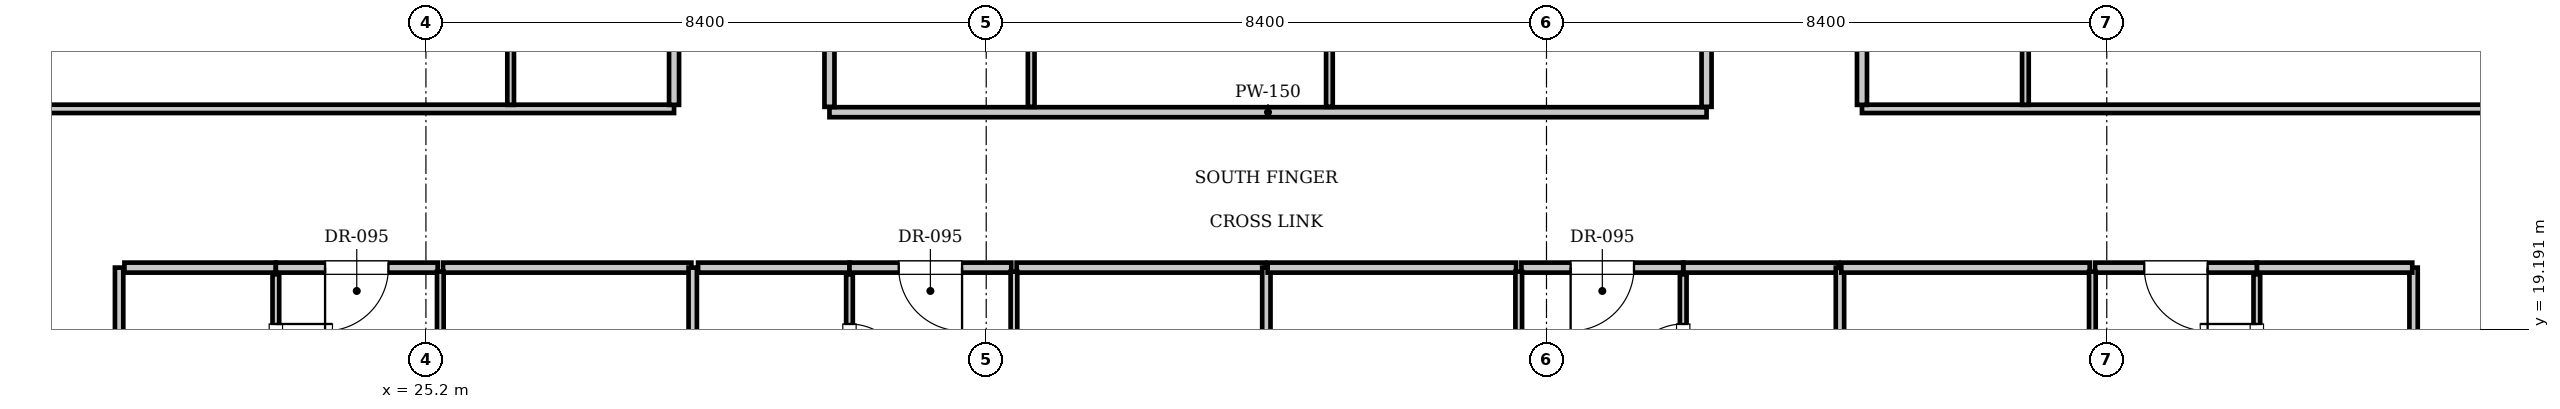
"""IFC4 building model, lengths in metres.
Left out: names, types, materials, properties, quantities, classifications, styles, units other than length and angle.
Written with IfcOpenShell. Run it as: python <this file> out.ifc"""

import sys

from ifc_helpers import new_model, si_unit, direction, frame, frame_2d, origin, place, context, subcontext, project, spatial, rectangle, extrude, element, fill, save


model = new_model("IFC4")
c1 = context("Model", 3, precision=1e-05, world=origin(), true_north=direction((0.0, 1.0)))
c2 = subcontext(c1, "Body", "Model", "MODEL_VIEW")
j1 = project(units=[si_unit("LENGTHUNIT", "METRE"), si_unit("PLANEANGLEUNIT", "RADIAN")], contexts=[c1])
p1 = place(None, origin())
s1 = spatial("IfcSite", under=j1, at=p1, CompositionType="ELEMENT")
p2 = place(p1, origin())
s2 = spatial("IfcBuilding", under=s1, at=p2, CompositionType="ELEMENT")
p3 = place(p2, frame((0.0, 0.0, 254.8)))
s3 = spatial("IfcBuildingStorey", under=s2, at=p3, CompositionType="ELEMENT", Elevation=254.8)
p4 = place(p3, frame((31.25, 22.45, 0.0), z_axis=(0.0, 0.0, 1.0), x_axis=(1.0, 0.0, 0.0)))
e1 = element("IfcWall", 1, at=p4, inside=s3, PredefinedType="PARTITIONING", context=c2, shape_type="SweptSolid", body=[
    extrude(rectangle(XDim=13.15, YDim=0.15, at=frame_2d((6.575, 0.0))), origin(), (0.0, 0.0, 1.0), 3.61),
])
for number, where, z_axis, x_axis in (
    (2, (31.25, 22.53, 0.0), (0.0, 0.0, 1.0), (0.0, 1.0, 0.0)),
    (3, (44.4, 22.53, 0.0), (0.0, 0.0, 1.0), (0.0, 1.0, 0.0)),
):
    element("IfcWall", number, at=place(p3, frame(where, z_axis=z_axis, x_axis=x_axis)), inside=s3, PredefinedType="PARTITIONING", context=c2, shape_type="SweptSolid", body=[
        extrude(rectangle(XDim=8.89, YDim=0.15, at=frame_2d((4.445, 0.0))), origin(), (0.0, 0.0, 1.0), 3.61),
    ])
for number, where, z_axis, x_axis in (
    (4, (34.274, 22.53, 0.0), (0.0, 0.0, 1.0), (0.0, 1.0, 0.0)),
    (5, (38.746, 22.53, 0.0), (0.0, 0.0, 1.0), (0.0, 1.0, 0.0)),
):
    element("IfcWall", number, at=place(p3, frame(where, z_axis=z_axis, x_axis=x_axis)), inside=s3, PredefinedType="PARTITIONING", context=c2, shape_type="SweptSolid", body=[
        extrude(rectangle(XDim=8.89, YDim=0.1, at=frame_2d((4.445, 0.0))), origin(), (0.0, 0.0, 1.0), 3.61),
    ])
for number, where, z_axis, x_axis in (
    (6, (20.6, 14.4, 0.0), (0.0, 0.0, 1.0), (0.0, 1.0, 0.0)),
    (7, (55.0, 14.4, 0.0), (0.0, 0.0, 1.0), (0.0, 1.0, 0.0)),
):
    element("IfcWall", number, at=place(p3, frame(where, z_axis=z_axis, x_axis=x_axis)), inside=s3, PredefinedType="PARTITIONING", context=c2, shape_type="SweptSolid", body=[
        extrude(rectangle(XDim=5.72, YDim=0.125, at=frame_2d((2.86, 0.0))), origin(), (0.0, 0.0, 1.0), 3.61),
    ])
p5 = place(p3, frame((20.68, 20.12, 0.0), z_axis=(0.0, 0.0, 1.0), x_axis=(1.0, 0.0, 0.0)))
e8 = element("IfcWall", 8, at=p5, inside=s3, PredefinedType="PARTITIONING", context=c2, shape_type="SweptSolid", body=[
    extrude(rectangle(XDim=2.27, YDim=0.15, at=frame_2d((1.135, 0.0))), origin(), (0.0, 0.0, 1.0), 3.61),
])
p6 = place(p3, frame((22.95, 17.68, 0.0), z_axis=(0.0, 0.0, 1.0), x_axis=(0.0, 1.0, 0.0)))
e9 = element("IfcWall", 9, at=p6, inside=s3, PredefinedType="PARTITIONING", context=c2, shape_type="SweptSolid", body=[
    extrude(rectangle(XDim=2.34, YDim=0.1, at=frame_2d((1.17, 0.0))), origin(), (0.0, 0.0, 1.0), 3.61),
])
p7 = place(p6, frame((0.745, 0.0, 0.0)))
e10 = element("IfcOpeningElement", 10, at=p7, cuts=e9, PredefinedType="OPENING", context=c2, shape_type="SweptSolid", body=[
    extrude(rectangle(XDim=0.85, YDim=2.1, at=frame_2d((0.425, 1.05))), frame((0.0, 0.06, 0.0), z_axis=(0.0, -1.0, 0.0), x_axis=(1.0, 0.0, 0.0)), (0.0, 0.0, 1.0), 0.12),
])
p8 = place(p3, frame((22.95, 20.12, 0.0), z_axis=(0.0, 0.0, 1.0), x_axis=(1.0, 0.0, 0.0)))
e11 = element("IfcWall", 11, at=p8, inside=s3, PredefinedType="PARTITIONING", context=c2, shape_type="SweptSolid", body=[
    extrude(rectangle(XDim=2.426, YDim=0.15, at=frame_2d((1.213, 0.0))), origin(), (0.0, 0.0, 1.0), 3.61),
])
p9 = place(p8, frame((0.738, 0.0, 0.0)))
e12 = element("IfcOpeningElement", 12, at=p9, cuts=e11, PredefinedType="OPENING", context=c2, shape_type="SweptSolid", body=[
    extrude(rectangle(XDim=0.95, YDim=2.15, at=frame_2d((0.475, 1.075))), frame((0.0, 0.085, 0.0), z_axis=(0.0, -1.0, 0.0), x_axis=(1.0, 0.0, 0.0)), (0.0, 0.0, 1.0), 0.17),
])
p10 = place(p3, frame((25.456, 20.12, 0.0), z_axis=(0.0, 0.0, 1.0), x_axis=(1.0, 0.0, 0.0)))
e13 = element("IfcWall", 13, at=p10, inside=s3, PredefinedType="PARTITIONING", context=c2, shape_type="SweptSolid", body=[
    extrude(rectangle(XDim=3.724, YDim=0.15, at=frame_2d((1.862, 0.0))), origin(), (0.0, 0.0, 1.0), 3.61),
])
p11 = place(p3, frame((25.416, 9.23, 0.0), z_axis=(0.0, 0.0, 1.0), x_axis=(0.0, 1.0, 0.0)))
e14 = element("IfcWall", 14, at=p11, inside=s3, PredefinedType="PARTITIONING", context=c2, shape_type="SweptSolid", body=[
    extrude(rectangle(XDim=10.83, YDim=0.1, at=frame_2d((5.415, 0.0))), origin(), (0.0, 0.0, 1.0), 3.61),
])
p12 = place(p11, frame((1.6, 0.0, 0.0)))
e15 = element("IfcOpeningElement", 15, at=p12, cuts=e14, PredefinedType="OPENING", context=c2, shape_type="SweptSolid", body=[
    extrude(rectangle(XDim=0.9, YDim=2.1, at=frame_2d((0.45, 1.05))), frame((0.0, 0.06, 0.0), z_axis=(0.0, -1.0, 0.0), x_axis=(1.0, 0.0, 0.0)), (0.0, 0.0, 1.0), 0.12),
])
p13 = place(p3, frame((29.2, 9.3, 0.0), z_axis=(0.0, 0.0, 1.0), x_axis=(0.0, 1.0, 0.0)))
e16 = element("IfcWall", 16, at=p13, inside=s3, PredefinedType="PARTITIONING", context=c2, shape_type="SweptSolid", body=[
    extrude(rectangle(XDim=10.82, YDim=0.125, at=frame_2d((5.41, 0.0))), origin(), (0.0, 0.0, 1.0), 3.61),
])
p14 = place(p3, frame((29.28, 20.12, 0.0), z_axis=(0.0, 0.0, 1.0), x_axis=(1.0, 0.0, 0.0)))
e17 = element("IfcWall", 17, at=p14, inside=s3, PredefinedType="PARTITIONING", context=c2, shape_type="SweptSolid", body=[
    extrude(rectangle(XDim=2.27, YDim=0.15, at=frame_2d((1.135, 0.0))), origin(), (0.0, 0.0, 1.0), 3.61),
])
p15 = place(p3, frame((31.55, 17.68, 0.0), z_axis=(0.0, 0.0, 1.0), x_axis=(0.0, 1.0, 0.0)))
e18 = element("IfcWall", 18, at=p15, inside=s3, PredefinedType="PARTITIONING", context=c2, shape_type="SweptSolid", body=[
    extrude(rectangle(XDim=2.34, YDim=0.1, at=frame_2d((1.17, 0.0))), origin(), (0.0, 0.0, 1.0), 3.61),
])
p16 = place(p15, frame((0.745, 0.0, 0.0)))
e19 = element("IfcOpeningElement", 19, at=p16, cuts=e18, PredefinedType="OPENING", context=c2, shape_type="SweptSolid", body=[
    extrude(rectangle(XDim=0.85, YDim=2.1, at=frame_2d((0.425, 1.05))), frame((0.0, 0.06, 0.0), z_axis=(0.0, -1.0, 0.0), x_axis=(1.0, 0.0, 0.0)), (0.0, 0.0, 1.0), 0.12),
])
p17 = place(p3, frame((31.55, 20.12, 0.0), z_axis=(0.0, 0.0, 1.0), x_axis=(1.0, 0.0, 0.0)))
e20 = element("IfcWall", 20, at=p17, inside=s3, PredefinedType="PARTITIONING", context=c2, shape_type="SweptSolid", body=[
    extrude(rectangle(XDim=2.426, YDim=0.15, at=frame_2d((1.213, 0.0))), origin(), (0.0, 0.0, 1.0), 3.61),
])
p18 = place(p17, frame((0.738, 0.0, 0.0)))
e21 = element("IfcOpeningElement", 21, at=p18, cuts=e20, PredefinedType="OPENING", context=c2, shape_type="SweptSolid", body=[
    extrude(rectangle(XDim=0.95, YDim=2.15, at=frame_2d((0.475, 1.075))), frame((0.0, 0.085, 0.0), z_axis=(0.0, -1.0, 0.0), x_axis=(1.0, 0.0, 0.0)), (0.0, 0.0, 1.0), 0.17),
])
p19 = place(p3, frame((34.056, 20.12, 0.0), z_axis=(0.0, 0.0, 1.0), x_axis=(1.0, 0.0, 0.0)))
e22 = element("IfcWall", 22, at=p19, inside=s3, PredefinedType="PARTITIONING", context=c2, shape_type="SweptSolid", body=[
    extrude(rectangle(XDim=3.724, YDim=0.15, at=frame_2d((1.862, 0.0))), origin(), (0.0, 0.0, 1.0), 3.61),
])
p20 = place(p3, frame((34.016, 9.23, 0.0), z_axis=(0.0, 0.0, 1.0), x_axis=(0.0, 1.0, 0.0)))
e23 = element("IfcWall", 23, at=p20, inside=s3, PredefinedType="PARTITIONING", context=c2, shape_type="SweptSolid", body=[
    extrude(rectangle(XDim=10.83, YDim=0.1, at=frame_2d((5.415, 0.0))), origin(), (0.0, 0.0, 1.0), 3.61),
])
p21 = place(p20, frame((1.6, 0.0, 0.0)))
e24 = element("IfcOpeningElement", 24, at=p21, cuts=e23, PredefinedType="OPENING", context=c2, shape_type="SweptSolid", body=[
    extrude(rectangle(XDim=0.9, YDim=2.1, at=frame_2d((0.45, 1.05))), frame((0.0, 0.06, 0.0), z_axis=(0.0, -1.0, 0.0), x_axis=(1.0, 0.0, 0.0)), (0.0, 0.0, 1.0), 0.12),
])
p22 = place(p3, frame((37.8, 9.3, 0.0), z_axis=(0.0, 0.0, 1.0), x_axis=(0.0, 1.0, 0.0)))
e25 = element("IfcWall", 25, at=p22, inside=s3, PredefinedType="PARTITIONING", context=c2, shape_type="SweptSolid", body=[
    extrude(rectangle(XDim=10.82, YDim=0.125, at=frame_2d((5.41, 0.0))), origin(), (0.0, 0.0, 1.0), 3.403),
])
p23 = place(p3, frame((44.05, 20.12, 0.0), z_axis=(0.0, 0.0, 1.0), x_axis=(1.0, 0.0, 0.0)))
e26 = element("IfcWall", 26, at=p23, inside=s3, PredefinedType="PARTITIONING", context=c2, shape_type="SweptSolid", body=[
    extrude(rectangle(XDim=2.33, YDim=0.15, at=frame_2d((1.165, 0.0))), origin(), (0.0, 0.0, 1.0), 3.61),
])
p24 = place(p3, frame((44.05, 17.68, 0.0), z_axis=(0.0, 0.0, 1.0), x_axis=(0.0, 1.0, 0.0)))
e27 = element("IfcWall", 27, at=p24, inside=s3, PredefinedType="PARTITIONING", context=c2, shape_type="SweptSolid", body=[
    extrude(rectangle(XDim=2.34, YDim=0.1, at=frame_2d((1.17, 0.0))), origin(), (0.0, 0.0, 1.0), 3.61),
])
p25 = place(p24, frame((0.745, 0.0, 0.0)))
e28 = element("IfcOpeningElement", 28, at=p25, cuts=e27, PredefinedType="OPENING", context=c2, shape_type="SweptSolid", body=[
    extrude(rectangle(XDim=0.85, YDim=2.1, at=frame_2d((0.425, 1.05))), frame((0.0, 0.06, 0.0), z_axis=(0.0, -1.0, 0.0), x_axis=(1.0, 0.0, 0.0)), (0.0, 0.0, 1.0), 0.12),
])
p26 = place(p3, frame((37.82, 20.12, 0.0), z_axis=(0.0, 0.0, 1.0), x_axis=(1.0, 0.0, 0.0)))
e29 = element("IfcWall", 29, at=p26, inside=s3, PredefinedType="PARTITIONING", context=c2, shape_type="SweptSolid", body=[
    extrude(rectangle(XDim=3.724, YDim=0.15, at=frame_2d((1.862, 0.0))), origin(), (0.0, 0.0, 1.0), 3.61),
])
p27 = place(p3, frame((41.624, 20.12, 0.0), z_axis=(0.0, 0.0, 1.0), x_axis=(1.0, 0.0, 0.0)))
e30 = element("IfcWall", 30, at=p27, inside=s3, PredefinedType="PARTITIONING", context=c2, shape_type="SweptSolid", body=[
    extrude(rectangle(XDim=2.426, YDim=0.15, at=frame_2d((1.213, 0.0))), origin(), (0.0, 0.0, 1.0), 3.61),
])
p28 = place(p27, frame((0.738, 0.0, 0.0)))
e31 = element("IfcOpeningElement", 31, at=p28, cuts=e30, PredefinedType="OPENING", context=c2, shape_type="SweptSolid", body=[
    extrude(rectangle(XDim=0.95, YDim=2.15, at=frame_2d((0.475, 1.075))), frame((0.0, 0.085, 0.0), z_axis=(0.0, -1.0, 0.0), x_axis=(1.0, 0.0, 0.0)), (0.0, 0.0, 1.0), 0.17),
])
p29 = place(p3, frame((41.584, 9.23, 0.0), z_axis=(0.0, 0.0, 1.0), x_axis=(0.0, 1.0, 0.0)))
e32 = element("IfcWall", 32, at=p29, inside=s3, PredefinedType="PARTITIONING", context=c2, shape_type="SweptSolid", body=[
    extrude(rectangle(XDim=10.83, YDim=0.1, at=frame_2d((5.415, 0.0))), origin(), (0.0, 0.0, 1.0), 3.61),
])
p30 = place(p29, frame((1.6, 0.0, 0.0)))
e33 = element("IfcOpeningElement", 33, at=p30, cuts=e32, PredefinedType="OPENING", context=c2, shape_type="SweptSolid", body=[
    extrude(rectangle(XDim=0.9, YDim=2.1, at=frame_2d((0.45, 1.05))), frame((0.0, 0.06, 0.0), z_axis=(0.0, -1.0, 0.0), x_axis=(1.0, 0.0, 0.0)), (0.0, 0.0, 1.0), 0.12),
])
p31 = place(p3, frame((46.4, 9.3, 0.0), z_axis=(0.0, 0.0, 1.0), x_axis=(0.0, 1.0, 0.0)))
e34 = element("IfcWall", 34, at=p31, inside=s3, PredefinedType="PARTITIONING", context=c2, shape_type="SweptSolid", body=[
    extrude(rectangle(XDim=10.82, YDim=0.125, at=frame_2d((5.41, 0.0))), origin(), (0.0, 0.0, 1.0), 3.61),
])
p32 = place(p3, frame((52.65, 20.12, 0.0), z_axis=(0.0, 0.0, 1.0), x_axis=(1.0, 0.0, 0.0)))
e35 = element("IfcWall", 35, at=p32, inside=s3, PredefinedType="PARTITIONING", context=c2, shape_type="SweptSolid", body=[
    extrude(rectangle(XDim=2.33, YDim=0.15, at=frame_2d((1.165, 0.0))), origin(), (0.0, 0.0, 1.0), 3.61),
])
p33 = place(p3, frame((52.65, 17.68, 0.0), z_axis=(0.0, 0.0, 1.0), x_axis=(0.0, 1.0, 0.0)))
e36 = element("IfcWall", 36, at=p33, inside=s3, PredefinedType="PARTITIONING", context=c2, shape_type="SweptSolid", body=[
    extrude(rectangle(XDim=2.34, YDim=0.1, at=frame_2d((1.17, 0.0))), origin(), (0.0, 0.0, 1.0), 3.61),
])
p34 = place(p33, frame((0.745, 0.0, 0.0)))
e37 = element("IfcOpeningElement", 37, at=p34, cuts=e36, PredefinedType="OPENING", context=c2, shape_type="SweptSolid", body=[
    extrude(rectangle(XDim=0.85, YDim=2.1, at=frame_2d((0.425, 1.05))), frame((0.0, 0.06, 0.0), z_axis=(0.0, -1.0, 0.0), x_axis=(1.0, 0.0, 0.0)), (0.0, 0.0, 1.0), 0.12),
])
p35 = place(p3, frame((46.42, 20.12, 0.0), z_axis=(0.0, 0.0, 1.0), x_axis=(1.0, 0.0, 0.0)))
e38 = element("IfcWall", 38, at=p35, inside=s3, PredefinedType="PARTITIONING", context=c2, shape_type="SweptSolid", body=[
    extrude(rectangle(XDim=3.724, YDim=0.15, at=frame_2d((1.862, 0.0))), origin(), (0.0, 0.0, 1.0), 3.61),
])
p36 = place(p3, frame((50.224, 20.12, 0.0), z_axis=(0.0, 0.0, 1.0), x_axis=(1.0, 0.0, 0.0)))
e39 = element("IfcWall", 39, at=p36, inside=s3, PredefinedType="PARTITIONING", context=c2, shape_type="SweptSolid", body=[
    extrude(rectangle(XDim=2.426, YDim=0.15, at=frame_2d((1.213, 0.0))), origin(), (0.0, 0.0, 1.0), 3.61),
])
p37 = place(p36, frame((0.738, 0.0, 0.0)))
e40 = element("IfcOpeningElement", 40, at=p37, cuts=e39, PredefinedType="OPENING", context=c2, shape_type="SweptSolid", body=[
    extrude(rectangle(XDim=0.95, YDim=2.15, at=frame_2d((0.475, 1.075))), frame((0.0, 0.085, 0.0), z_axis=(0.0, -1.0, 0.0), x_axis=(1.0, 0.0, 0.0)), (0.0, 0.0, 1.0), 0.17),
])
p38 = place(p3, frame((50.184, 9.23, 0.0), z_axis=(0.0, 0.0, 1.0), x_axis=(0.0, 1.0, 0.0)))
e41 = element("IfcWall", 41, at=p38, inside=s3, PredefinedType="PARTITIONING", context=c2, shape_type="SweptSolid", body=[
    extrude(rectangle(XDim=10.83, YDim=0.1, at=frame_2d((5.415, 0.0))), origin(), (0.0, 0.0, 1.0), 3.61),
])
p39 = place(p38, frame((1.6, 0.0, 0.0)))
e42 = element("IfcOpeningElement", 42, at=p39, cuts=e41, PredefinedType="OPENING", context=c2, shape_type="SweptSolid", body=[
    extrude(rectangle(XDim=0.9, YDim=2.1, at=frame_2d((0.45, 1.05))), frame((0.0, 0.06, 0.0), z_axis=(0.0, -1.0, 0.0), x_axis=(1.0, 0.0, 0.0)), (0.0, 0.0, 1.0), 0.12),
])
p40 = place(p3, frame((15.5, 22.5, 0.0), z_axis=(0.0, 0.0, 1.0), x_axis=(1.0, 0.0, 0.0)))
e43 = element("IfcWall", 43, at=p40, inside=s3, PredefinedType="PARTITIONING", context=c2, shape_type="SweptSolid", body=[
    extrude(rectangle(XDim=13.42, YDim=0.125, at=frame_2d((6.71, 0.0))), origin(), (0.0, 0.0, 1.0), 3.61),
])
p41 = place(p3, frame((46.73, 22.5, 0.0), z_axis=(0.0, 0.0, 1.0), x_axis=(1.0, 0.0, 0.0)))
e44 = element("IfcWall", 44, at=p41, inside=s3, PredefinedType="PARTITIONING", context=c2, shape_type="SweptSolid", body=[
    extrude(rectangle(XDim=13.37, YDim=0.125, at=frame_2d((6.685, 0.0))), origin(), (0.0, 0.0, 1.0), 3.61),
])
p42 = place(p3, frame((28.92, 22.56, 0.0), z_axis=(0.0, 0.0, 1.0), x_axis=(0.0, 1.0, 0.0)))
e45 = element("IfcWall", 45, at=p42, inside=s3, PredefinedType="PARTITIONING", context=c2, shape_type="SweptSolid", body=[
    extrude(rectangle(XDim=1.89, YDim=0.15, at=frame_2d((0.945, 0.0))), origin(), (0.0, 0.0, 1.0), 3.61),
])
p43 = place(p3, frame((26.47, 22.56, 0.0), z_axis=(0.0, 0.0, 1.0), x_axis=(0.0, 1.0, 0.0)))
e46 = element("IfcWall", 46, at=p43, inside=s3, PredefinedType="PARTITIONING", context=c2, shape_type="SweptSolid", body=[
    extrude(rectangle(XDim=1.89, YDim=0.1, at=frame_2d((0.945, 0.0))), origin(), (0.0, 0.0, 1.0), 3.61),
])
p44 = place(p3, frame((46.73, 22.56, 0.0), z_axis=(0.0, 0.0, 1.0), x_axis=(0.0, 1.0, 0.0)))
e47 = element("IfcWall", 47, at=p44, inside=s3, PredefinedType="PARTITIONING", context=c2, shape_type="SweptSolid", body=[
    extrude(rectangle(XDim=1.89, YDim=0.15, at=frame_2d((0.945, 0.0))), origin(), (0.0, 0.0, 1.0), 3.61),
])
p45 = place(p3, frame((49.18, 22.56, 0.0), z_axis=(0.0, 0.0, 1.0), x_axis=(0.0, 1.0, 0.0)))
e48 = element("IfcWall", 48, at=p45, inside=s3, PredefinedType="PARTITIONING", context=c2, shape_type="SweptSolid", body=[
    extrude(rectangle(XDim=1.89, YDim=0.1, at=frame_2d((0.945, 0.0))), origin(), (0.0, 0.0, 1.0), 3.61),
])
p46 = place(p7, frame((0.85, 0.0, 0.0), z_axis=(0.0, 0.0, 1.0), x_axis=(-1.0, 0.0, 0.0)))
e49 = element("IfcDoor", 49, at=p46, inside=s3, OperationType="SINGLE_SWING_LEFT", PredefinedType="DOOR", context=c2, shape_type="SweptSolid", body=[
    extrude(rectangle(XDim=0.85, YDim=2.1, at=frame_2d((0.425, 1.05))), frame((0.0, 0.025, 0.0), z_axis=(0.0, -1.0, 0.0), x_axis=(1.0, 0.0, 0.0)), (0.0, 0.0, 1.0), 0.05),
])
fill(e10, e49)
p47 = place(p9, frame((0.95, 0.0, 0.0), z_axis=(0.0, 0.0, 1.0), x_axis=(-1.0, 0.0, 0.0)))
e50 = element("IfcDoor", 50, at=p47, inside=s3, OperationType="SINGLE_SWING_RIGHT", PredefinedType="DOOR", context=c2, shape_type="SweptSolid", body=[
    extrude(rectangle(XDim=0.95, YDim=2.15, at=frame_2d((0.475, 1.075))), frame((0.0, 0.025, 0.0), z_axis=(0.0, -1.0, 0.0), x_axis=(1.0, 0.0, 0.0)), (0.0, 0.0, 1.0), 0.05),
])
fill(e12, e50)
p48 = place(p16, frame((0.85, 0.0, 0.0), z_axis=(0.0, 0.0, 1.0), x_axis=(-1.0, 0.0, 0.0)))
e51 = element("IfcDoor", 51, at=p48, inside=s3, OperationType="SINGLE_SWING_RIGHT", PredefinedType="DOOR", context=c2, shape_type="SweptSolid", body=[
    extrude(rectangle(XDim=0.85, YDim=2.1, at=frame_2d((0.425, 1.05))), frame((0.0, 0.025, 0.0), z_axis=(0.0, -1.0, 0.0), x_axis=(1.0, 0.0, 0.0)), (0.0, 0.0, 1.0), 0.05),
])
fill(e19, e51)
p49 = place(p18, frame((0.95, 0.0, 0.0), z_axis=(0.0, 0.0, 1.0), x_axis=(-1.0, 0.0, 0.0)))
e52 = element("IfcDoor", 52, at=p49, inside=s3, OperationType="SINGLE_SWING_LEFT", PredefinedType="DOOR", context=c2, shape_type="SweptSolid", body=[
    extrude(rectangle(XDim=0.95, YDim=2.15, at=frame_2d((0.475, 1.075))), frame((0.0, 0.025, 0.0), z_axis=(0.0, -1.0, 0.0), x_axis=(1.0, 0.0, 0.0)), (0.0, 0.0, 1.0), 0.05),
])
fill(e21, e52)
p50 = place(p25, origin())
e53 = element("IfcDoor", 53, at=p50, inside=s3, OperationType="SINGLE_SWING_LEFT", PredefinedType="DOOR", context=c2, shape_type="SweptSolid", body=[
    extrude(rectangle(XDim=0.85, YDim=2.1, at=frame_2d((0.425, 1.05))), frame((0.0, 0.025, 0.0), z_axis=(0.0, -1.0, 0.0), x_axis=(1.0, 0.0, 0.0)), (0.0, 0.0, 1.0), 0.05),
])
fill(e28, e53)
p51 = place(p28, frame((0.95, 0.0, 0.0), z_axis=(0.0, 0.0, 1.0), x_axis=(-1.0, 0.0, 0.0)))
e54 = element("IfcDoor", 54, at=p51, inside=s3, OperationType="SINGLE_SWING_RIGHT", PredefinedType="DOOR", context=c2, shape_type="SweptSolid", body=[
    extrude(rectangle(XDim=0.95, YDim=2.15, at=frame_2d((0.475, 1.075))), frame((0.0, 0.025, 0.0), z_axis=(0.0, -1.0, 0.0), x_axis=(1.0, 0.0, 0.0)), (0.0, 0.0, 1.0), 0.05),
])
fill(e31, e54)
p52 = place(p34, origin())
e55 = element("IfcDoor", 55, at=p52, inside=s3, OperationType="SINGLE_SWING_RIGHT", PredefinedType="DOOR", context=c2, shape_type="SweptSolid", body=[
    extrude(rectangle(XDim=0.85, YDim=2.1, at=frame_2d((0.425, 1.05))), frame((0.0, 0.025, 0.0), z_axis=(0.0, -1.0, 0.0), x_axis=(1.0, 0.0, 0.0)), (0.0, 0.0, 1.0), 0.05),
])
fill(e37, e55)
p53 = place(p37, frame((0.95, 0.0, 0.0), z_axis=(0.0, 0.0, 1.0), x_axis=(-1.0, 0.0, 0.0)))
e56 = element("IfcDoor", 56, at=p53, inside=s3, OperationType="SINGLE_SWING_LEFT", PredefinedType="DOOR", context=c2, shape_type="SweptSolid", body=[
    extrude(rectangle(XDim=0.95, YDim=2.15, at=frame_2d((0.475, 1.075))), frame((0.0, 0.025, 0.0), z_axis=(0.0, -1.0, 0.0), x_axis=(1.0, 0.0, 0.0)), (0.0, 0.0, 1.0), 0.05),
])
fill(e40, e56)
save(model, sys.argv[1])
